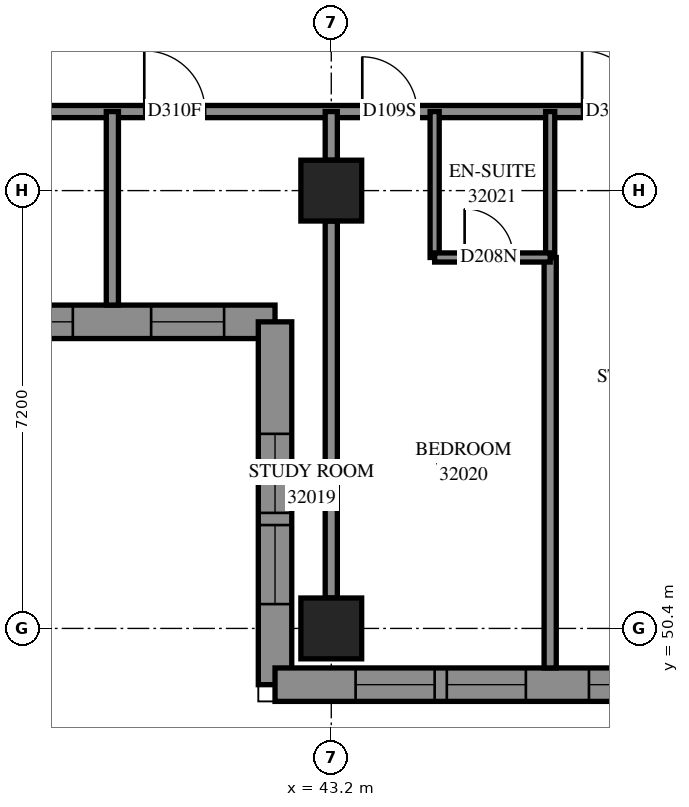
"""IFC4 building model, lengths in metres.
Left out: names, types, materials, properties, quantities, classifications, styles, units other than length and angle.
Written with IfcOpenShell. Run it as: python <this file> out.ifc"""

import sys

from ifc_helpers import new_model, si_unit, direction, frame, frame_2d, origin, origin_2d, place, context, subcontext, project, spatial, polyline, rectangle, outline, extrude, element, fill, save


model = new_model("IFC4")
c1 = context("Model", 3, precision=1e-05, world=origin(), true_north=direction((0.0, 1.0)))
c2 = subcontext(c1, "Body", "Model", "MODEL_VIEW")
j1 = project(units=[si_unit("LENGTHUNIT", "METRE"), si_unit("PLANEANGLEUNIT", "RADIAN")], contexts=[c1])
p1 = place(None, origin())
s1 = spatial("IfcSite", under=j1, at=p1, CompositionType="ELEMENT")
p2 = place(p1, origin())
s2 = spatial("IfcBuilding", under=s1, at=p2, CompositionType="ELEMENT")
p3 = place(p2, frame((0.0, 0.0, 118.6)))
s3 = spatial("IfcBuildingStorey", under=s2, at=p3, CompositionType="ELEMENT", Elevation=118.6)
for number, where, z_axis, x_axis in (
    (1, (43.2, 50.4, 0.0), (0.0, 0.0, 1.0), (1.0, 0.0, 0.0)),
    (2, (43.2, 57.6, 0.0), (0.0, 0.0, 1.0), (1.0, 0.0, 0.0)),
):
    element("IfcColumn", number, at=place(p3, frame(where, z_axis=z_axis, x_axis=x_axis)), inside=s3, PredefinedType="COLUMN", context=c2, shape_type="SweptSolid", body=[
        extrude(rectangle(XDim=1.0, YDim=1.0, at=origin_2d()), origin(), (0.0, 0.0, 1.0), 3.1),
    ])
p4 = place(p3, frame((27.875, 55.442, 0.0), z_axis=(0.0, 0.0, 1.0), x_axis=(1.0, 0.0, 0.0)))
e3 = element("IfcWall", 3, at=p4, inside=s3, PredefinedType="SOLIDWALL", context=c2, shape_type="SweptSolid", body=[
    extrude(outline(polyline([(-0.275, -0.275), (14.125, -0.275), (14.675, 0.275), (0.275, 0.275), (-0.275, -0.275)])), origin(), (0.0, 0.0, 1.0), 3.1),
])
p5 = place(p4, frame((1.175, 0.0, 0.5)))
e4 = element("IfcOpeningElement", 4, at=p5, cuts=e3, PredefinedType="OPENING", context=c2, shape_type="SweptSolid", body=[
    extrude(rectangle(XDim=1.3, YDim=2.45, at=frame_2d((0.65, 1.225))), frame((0.0, 0.285, 0.0), z_axis=(0.0, -1.0, 0.0), x_axis=(1.0, 0.0, 0.0)), (0.0, 0.0, 1.0), 0.57),
])
p6 = place(p4, frame((2.675, 0.0, 0.5)))
e5 = element("IfcOpeningElement", 5, at=p6, cuts=e3, PredefinedType="OPENING", context=c2, shape_type="SweptSolid", body=[
    extrude(rectangle(XDim=1.3, YDim=2.45, at=frame_2d((0.65, 1.225))), frame((0.0, 0.285, 0.0), z_axis=(0.0, -1.0, 0.0), x_axis=(1.0, 0.0, 0.0)), (0.0, 0.0, 1.0), 0.57),
])
p7 = place(p4, frame((4.925, 0.0, 0.5)))
e6 = element("IfcOpeningElement", 6, at=p7, cuts=e3, PredefinedType="OPENING", context=c2, shape_type="SweptSolid", body=[
    extrude(rectangle(XDim=1.3, YDim=2.45, at=frame_2d((0.65, 1.225))), frame((0.0, 0.285, 0.0), z_axis=(0.0, -1.0, 0.0), x_axis=(1.0, 0.0, 0.0)), (0.0, 0.0, 1.0), 0.57),
])
p8 = place(p4, frame((6.425, 0.0, 0.5)))
e7 = element("IfcOpeningElement", 7, at=p8, cuts=e3, PredefinedType="OPENING", context=c2, shape_type="SweptSolid", body=[
    extrude(rectangle(XDim=1.3, YDim=2.45, at=frame_2d((0.65, 1.225))), frame((0.0, 0.285, 0.0), z_axis=(0.0, -1.0, 0.0), x_axis=(1.0, 0.0, 0.0)), (0.0, 0.0, 1.0), 0.57),
])
p9 = place(p4, frame((8.275, 0.0, 0.5)))
e8 = element("IfcOpeningElement", 8, at=p9, cuts=e3, PredefinedType="OPENING", context=c2, shape_type="SweptSolid", body=[
    extrude(rectangle(XDim=1.3, YDim=2.45, at=frame_2d((0.65, 1.225))), frame((0.0, 0.285, 0.0), z_axis=(0.0, -1.0, 0.0), x_axis=(1.0, 0.0, 0.0)), (0.0, 0.0, 1.0), 0.57),
])
p10 = place(p4, frame((9.775, 0.0, 0.5)))
e9 = element("IfcOpeningElement", 9, at=p10, cuts=e3, PredefinedType="OPENING", context=c2, shape_type="SweptSolid", body=[
    extrude(rectangle(XDim=1.3, YDim=2.45, at=frame_2d((0.65, 1.225))), frame((0.0, 0.285, 0.0), z_axis=(0.0, -1.0, 0.0), x_axis=(1.0, 0.0, 0.0)), (0.0, 0.0, 1.0), 0.57),
])
p11 = place(p4, frame((12.363, 0.0, 0.5)))
e10 = element("IfcOpeningElement", 10, at=p11, cuts=e3, PredefinedType="OPENING", context=c2, shape_type="SweptSolid", body=[
    extrude(rectangle(XDim=1.2, YDim=2.45, at=frame_2d((0.6, 1.225))), frame((0.0, 0.285, 0.0), z_axis=(0.0, -1.0, 0.0), x_axis=(1.0, 0.0, 0.0)), (0.0, 0.0, 1.0), 0.57),
])
p12 = place(p3, frame((42.275, 55.442, 0.0), z_axis=(0.0, 0.0, 1.0), x_axis=(0.0, -1.0, 0.0)))
e11 = element("IfcWall", 11, at=p12, inside=s3, PredefinedType="SOLIDWALL", context=c2, shape_type="SweptSolid", body=[
    extrude(outline(polyline([(0.275, -0.275), (6.242, -0.275), (5.692, 0.275), (-0.275, 0.275), (0.275, -0.275)])), origin(), (0.0, 0.0, 1.0), 3.1),
])
p13 = place(p12, frame((1.842, 0.0, 0.5)))
e12 = element("IfcOpeningElement", 12, at=p13, cuts=e11, PredefinedType="OPENING", context=c2, shape_type="SweptSolid", body=[
    extrude(rectangle(XDim=1.3, YDim=2.45, at=frame_2d((0.65, 1.225))), frame((0.0, 0.285, 0.0), z_axis=(0.0, -1.0, 0.0), x_axis=(1.0, 0.0, 0.0)), (0.0, 0.0, 1.0), 0.57),
])
p14 = place(p12, frame((3.342, 0.0, 0.5)))
e13 = element("IfcOpeningElement", 13, at=p14, cuts=e11, PredefinedType="OPENING", context=c2, shape_type="SweptSolid", body=[
    extrude(rectangle(XDim=1.3, YDim=2.45, at=frame_2d((0.65, 1.225))), frame((0.0, 0.285, 0.0), z_axis=(0.0, -1.0, 0.0), x_axis=(1.0, 0.0, 0.0)), (0.0, 0.0, 1.0), 0.57),
])
p15 = place(p3, frame((42.275, 49.475, 0.0), z_axis=(0.0, 0.0, 1.0), x_axis=(1.0, 0.0, 0.0)))
e14 = element("IfcWall", 14, at=p15, inside=s3, PredefinedType="SOLIDWALL", context=c2, shape_type="SweptSolid", body=[
    extrude(outline(polyline([(-0.275, -0.275), (6.925, -0.275), (7.475, 0.275), (0.275, 0.275), (-0.275, -0.275)])), origin(), (0.0, 0.0, 1.0), 3.1),
])
p16 = place(p15, frame((1.325, 0.0, 0.5)))
e15 = element("IfcOpeningElement", 15, at=p16, cuts=e14, PredefinedType="OPENING", context=c2, shape_type="SweptSolid", body=[
    extrude(rectangle(XDim=1.3, YDim=2.45, at=frame_2d((0.65, 1.225))), frame((0.0, 0.285, 0.0), z_axis=(0.0, -1.0, 0.0), x_axis=(1.0, 0.0, 0.0)), (0.0, 0.0, 1.0), 0.57),
])
p17 = place(p15, frame((2.825, 0.0, 0.5)))
e16 = element("IfcOpeningElement", 16, at=p17, cuts=e14, PredefinedType="OPENING", context=c2, shape_type="SweptSolid", body=[
    extrude(rectangle(XDim=1.3, YDim=2.45, at=frame_2d((0.65, 1.225))), frame((0.0, 0.285, 0.0), z_axis=(0.0, -1.0, 0.0), x_axis=(1.0, 0.0, 0.0)), (0.0, 0.0, 1.0), 0.57),
])
p18 = place(p15, frame((5.162, 0.0, 0.5)))
e17 = element("IfcOpeningElement", 17, at=p18, cuts=e14, PredefinedType="OPENING", context=c2, shape_type="SweptSolid", body=[
    extrude(rectangle(XDim=1.2, YDim=2.45, at=frame_2d((0.6, 1.225))), frame((0.0, 0.285, 0.0), z_axis=(0.0, -1.0, 0.0), x_axis=(1.0, 0.0, 0.0)), (0.0, 0.0, 1.0), 0.57),
])
p19 = place(p3, frame((28.802, 58.9, 0.0), z_axis=(0.0, 0.0, 1.0), x_axis=(1.0, 0.0, 0.0)))
e18 = element("IfcWall", 18, at=p19, inside=s3, PredefinedType="PARTITIONING", context=c2, shape_type="SweptSolid", body=[
    extrude(rectangle(XDim=24.098, YDim=0.2, at=frame_2d((12.049, 0.0))), origin(), (0.0, 0.0, 1.0), 3.1),
])
p20 = place(p19, frame((11.323, 0.0, 0.0)))
e19 = element("IfcOpeningElement", 19, at=p20, cuts=e18, PredefinedType="OPENING", context=c2, shape_type="SweptSolid", body=[
    extrude(rectangle(XDim=1.0, YDim=2.1, at=frame_2d((0.5, 1.05))), frame((0.0, 0.11, 0.0), z_axis=(0.0, -1.0, 0.0), x_axis=(1.0, 0.0, 0.0)), (0.0, 0.0, 1.0), 0.22),
])
p21 = place(p19, frame((14.908, 0.0, 0.0)))
e20 = element("IfcOpeningElement", 20, at=p21, cuts=e18, PredefinedType="OPENING", context=c2, shape_type="SweptSolid", body=[
    extrude(rectangle(XDim=0.9, YDim=2.1, at=frame_2d((0.45, 1.05))), frame((0.0, 0.11, 0.0), z_axis=(0.0, -1.0, 0.0), x_axis=(1.0, 0.0, 0.0)), (0.0, 0.0, 1.0), 0.22),
])
p22 = place(p19, frame((18.523, 0.0, 0.0)))
e21 = element("IfcOpeningElement", 21, at=p22, cuts=e18, PredefinedType="OPENING", context=c2, shape_type="SweptSolid", body=[
    extrude(rectangle(XDim=1.0, YDim=2.1, at=frame_2d((0.5, 1.05))), frame((0.0, 0.11, 0.0), z_axis=(0.0, -1.0, 0.0), x_axis=(1.0, 0.0, 0.0)), (0.0, 0.0, 1.0), 0.22),
])
p23 = place(p19, frame((22.845, 0.0, 0.0)))
e22 = element("IfcOpeningElement", 22, at=p23, cuts=e18, PredefinedType="OPENING", context=c2, shape_type="SweptSolid", body=[
    extrude(rectangle(XDim=1.0, YDim=2.1, at=frame_2d((0.5, 1.05))), frame((0.0, 0.11, 0.0), z_axis=(0.0, -1.0, 0.0), x_axis=(1.0, 0.0, 0.0)), (0.0, 0.0, 1.0), 0.22),
])
p24 = place(p3, frame((46.8, 49.75, 0.0), z_axis=(0.0, 0.0, 1.0), x_axis=(0.0, 1.0, 0.0)))
e23 = element("IfcWall", 23, at=p24, inside=s3, PredefinedType="PARTITIONING", context=c2, shape_type="SweptSolid", body=[
    extrude(rectangle(XDim=6.75, YDim=0.2, at=frame_2d((3.375, 0.0))), origin(), (0.0, 0.0, 1.0), 3.1),
])
p25 = place(p3, frame((43.2, 50.9, 0.0), z_axis=(0.0, 0.0, 1.0), x_axis=(0.0, 1.0, 0.0)))
e24 = element("IfcWall", 24, at=p25, inside=s3, PredefinedType="PARTITIONING", context=c2, shape_type="SweptSolid", body=[
    extrude(rectangle(XDim=6.2, YDim=0.2, at=frame_2d((3.1, 0.0))), origin(), (0.0, 0.0, 1.0), 2.6),
])
p26 = place(p3, frame((39.6, 55.717, 0.0), z_axis=(0.0, 0.0, 1.0), x_axis=(0.0, 1.0, 0.0)))
e25 = element("IfcWall", 25, at=p26, inside=s3, PredefinedType="PARTITIONING", context=c2, shape_type="SweptSolid", body=[
    extrude(rectangle(XDim=3.183, YDim=0.2, at=frame_2d((1.591, 0.0))), origin(), (0.0, 0.0, 1.0), 3.1),
])
for number, where, z_axis, x_axis in (
    (26, (44.9, 56.5, 0.0), (0.0, 0.0, 1.0), (0.0, 1.0, 0.0)),
    (27, (46.8, 56.5, 0.0), (0.0, 0.0, 1.0), (0.0, 1.0, 0.0)),
):
    element("IfcWall", number, at=place(p3, frame(where, z_axis=z_axis, x_axis=x_axis)), inside=s3, PredefinedType="PARTITIONING", context=c2, shape_type="SweptSolid", body=[
        extrude(rectangle(XDim=2.4, YDim=0.15, at=frame_2d((1.2, 0.0))), origin(), (0.0, 0.0, 1.0), 3.1),
    ])
p27 = place(p3, frame((44.9, 56.5, 0.0), z_axis=(0.0, 0.0, 1.0), x_axis=(1.0, 0.0, 0.0)))
e28 = element("IfcWall", 28, at=p27, inside=s3, PredefinedType="PARTITIONING", context=c2, shape_type="SweptSolid", body=[
    extrude(rectangle(XDim=1.9, YDim=0.15, at=frame_2d((0.95, 0.0))), origin(), (0.0, 0.0, 1.0), 3.1),
])
p28 = place(p27, frame((0.493, 0.0, 0.0)))
e29 = element("IfcOpeningElement", 29, at=p28, cuts=e28, PredefinedType="OPENING", context=c2, shape_type="SweptSolid", body=[
    extrude(rectangle(XDim=0.8, YDim=2.1, at=frame_2d((0.4, 1.05))), frame((0.0, 0.085, 0.0), z_axis=(0.0, -1.0, 0.0), x_axis=(1.0, 0.0, 0.0)), (0.0, 0.0, 1.0), 0.17),
])
p29 = place(p3, frame((43.2, 58.1, 0.0), z_axis=(0.0, 0.0, 1.0), x_axis=(0.0, 1.0, 0.0)))
e30 = element("IfcWall", 30, at=p29, inside=s3, PredefinedType="PARTITIONING", context=c2, shape_type="SweptSolid", body=[
    extrude(rectangle(XDim=0.8, YDim=0.2, at=frame_2d((0.4, 0.0))), origin(), (0.0, 0.0, 1.0), 3.1),
])
p30 = place(p10, origin())
e31 = element("IfcWindow", 31, at=p30, inside=s3, PartitioningType="SINGLE_PANEL", PredefinedType="WINDOW", context=c2, shape_type="SweptSolid", body=[
    extrude(rectangle(XDim=1.3, YDim=2.45, at=frame_2d((0.65, 1.225))), frame((0.0, 0.155, 0.0), z_axis=(0.0, -1.0, 0.0), x_axis=(1.0, 0.0, 0.0)), (0.0, 0.0, 1.0), 0.06),
])
fill(e9, e31)
p31 = place(p11, origin())
e32 = element("IfcWindow", 32, at=p31, inside=s3, PartitioningType="SINGLE_PANEL", PredefinedType="WINDOW", context=c2, shape_type="SweptSolid", body=[
    extrude(rectangle(XDim=1.2, YDim=2.45, at=frame_2d((0.6, 1.225))), frame((0.0, 0.155, 0.0), z_axis=(0.0, -1.0, 0.0), x_axis=(1.0, 0.0, 0.0)), (0.0, 0.0, 1.0), 0.06),
])
fill(e10, e32)
p32 = place(p13, origin())
e33 = element("IfcWindow", 33, at=p32, inside=s3, PartitioningType="SINGLE_PANEL", PredefinedType="WINDOW", context=c2, shape_type="SweptSolid", body=[
    extrude(rectangle(XDim=1.3, YDim=2.45, at=frame_2d((0.65, 1.225))), frame((0.0, 0.155, 0.0), z_axis=(0.0, -1.0, 0.0), x_axis=(1.0, 0.0, 0.0)), (0.0, 0.0, 1.0), 0.06),
])
fill(e12, e33)
p33 = place(p14, origin())
e34 = element("IfcWindow", 34, at=p33, inside=s3, PartitioningType="SINGLE_PANEL", PredefinedType="WINDOW", context=c2, shape_type="SweptSolid", body=[
    extrude(rectangle(XDim=1.3, YDim=2.45, at=frame_2d((0.65, 1.225))), frame((0.0, 0.155, 0.0), z_axis=(0.0, -1.0, 0.0), x_axis=(1.0, 0.0, 0.0)), (0.0, 0.0, 1.0), 0.06),
])
fill(e13, e34)
p34 = place(p16, origin())
e35 = element("IfcWindow", 35, at=p34, inside=s3, PartitioningType="SINGLE_PANEL", PredefinedType="WINDOW", context=c2, shape_type="SweptSolid", body=[
    extrude(rectangle(XDim=1.3, YDim=2.45, at=frame_2d((0.65, 1.225))), frame((0.0, 0.155, 0.0), z_axis=(0.0, -1.0, 0.0), x_axis=(1.0, 0.0, 0.0)), (0.0, 0.0, 1.0), 0.06),
])
fill(e15, e35)
p35 = place(p17, origin())
e36 = element("IfcWindow", 36, at=p35, inside=s3, PartitioningType="SINGLE_PANEL", PredefinedType="WINDOW", context=c2, shape_type="SweptSolid", body=[
    extrude(rectangle(XDim=1.3, YDim=2.45, at=frame_2d((0.65, 1.225))), frame((0.0, 0.155, 0.0), z_axis=(0.0, -1.0, 0.0), x_axis=(1.0, 0.0, 0.0)), (0.0, 0.0, 1.0), 0.06),
])
fill(e16, e36)
p36 = place(p18, origin())
e37 = element("IfcWindow", 37, at=p36, inside=s3, PartitioningType="SINGLE_PANEL", PredefinedType="WINDOW", context=c2, shape_type="SweptSolid", body=[
    extrude(rectangle(XDim=1.2, YDim=2.45, at=frame_2d((0.6, 1.225))), frame((0.0, 0.155, 0.0), z_axis=(0.0, -1.0, 0.0), x_axis=(1.0, 0.0, 0.0)), (0.0, 0.0, 1.0), 0.06),
])
fill(e17, e37)
p37 = place(p20, origin())
e38 = element("IfcDoor", 38, at=p37, inside=s3, OperationType="SINGLE_SWING_RIGHT", PredefinedType="DOOR", context=c2, shape_type="SweptSolid", body=[
    extrude(rectangle(XDim=1.0, YDim=2.1, at=frame_2d((0.5, 1.05))), frame((0.0, 0.025, 0.0), z_axis=(0.0, -1.0, 0.0), x_axis=(1.0, 0.0, 0.0)), (0.0, 0.0, 1.0), 0.05),
])
fill(e19, e38)
p38 = place(p21, origin())
e39 = element("IfcDoor", 39, at=p38, inside=s3, OperationType="SINGLE_SWING_LEFT", PredefinedType="DOOR", context=c2, shape_type="SweptSolid", body=[
    extrude(rectangle(XDim=0.9, YDim=2.1, at=frame_2d((0.45, 1.05))), frame((0.0, 0.025, 0.0), z_axis=(0.0, -1.0, 0.0), x_axis=(1.0, 0.0, 0.0)), (0.0, 0.0, 1.0), 0.05),
])
fill(e20, e39)
p39 = place(p28, origin())
e40 = element("IfcDoor", 40, at=p39, inside=s3, OperationType="SINGLE_SWING_RIGHT", PredefinedType="DOOR", context=c2, shape_type="SweptSolid", body=[
    extrude(rectangle(XDim=0.8, YDim=2.1, at=frame_2d((0.4, 1.05))), frame((0.0, 0.025, 0.0), z_axis=(0.0, -1.0, 0.0), x_axis=(1.0, 0.0, 0.0)), (0.0, 0.0, 1.0), 0.05),
])
fill(e29, e40)
p40 = place(p22, origin())
e41 = element("IfcDoor", 41, at=p40, inside=s3, OperationType="SINGLE_SWING_RIGHT", PredefinedType="DOOR", context=c2, shape_type="SweptSolid", body=[
    extrude(rectangle(XDim=1.0, YDim=2.1, at=frame_2d((0.5, 1.05))), frame((0.0, 0.025, 0.0), z_axis=(0.0, -1.0, 0.0), x_axis=(1.0, 0.0, 0.0)), (0.0, 0.0, 1.0), 0.05),
])
fill(e21, e41)
save(model, sys.argv[1])
